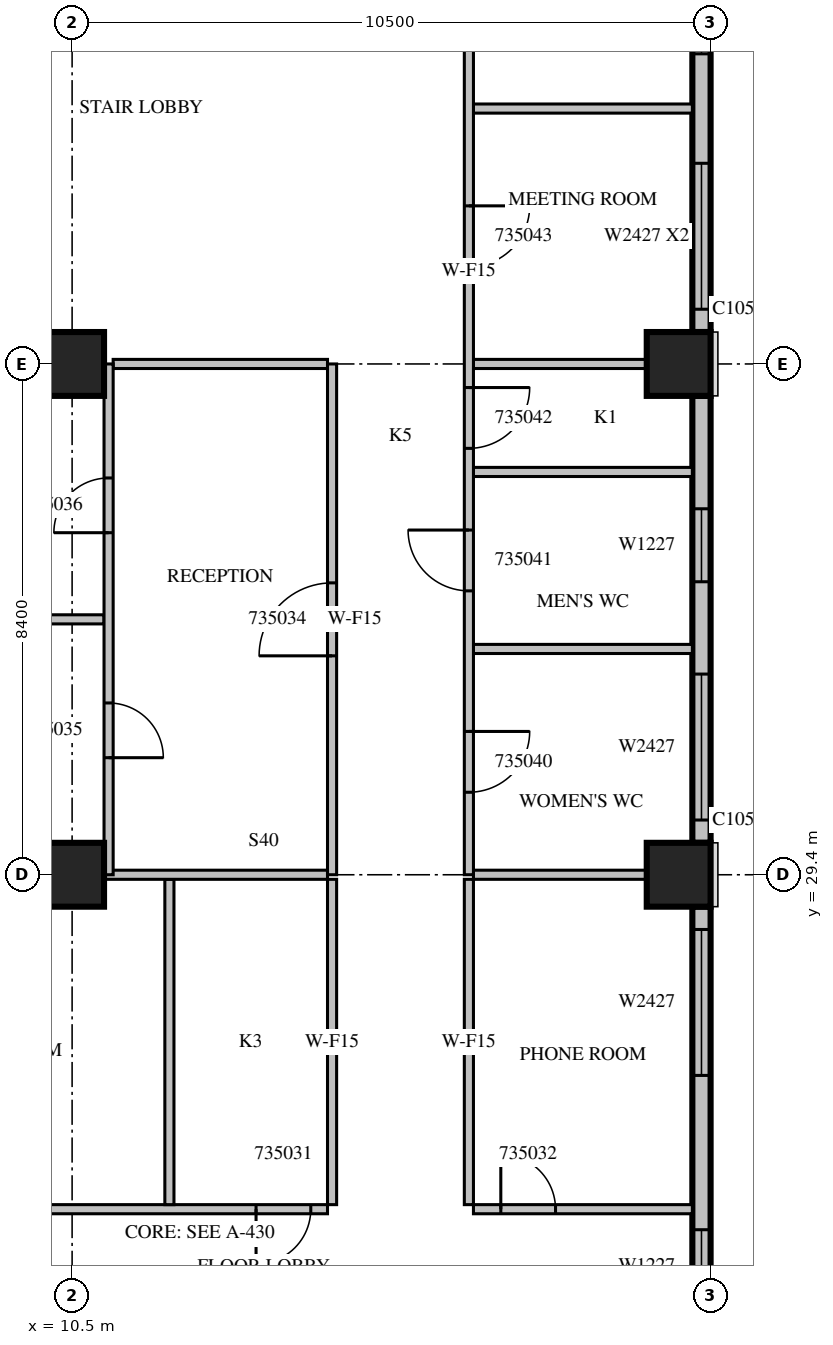
"""IFC4 building model, lengths in metres.
Left out: names, types, materials, properties, quantities, classifications, styles, units other than length and angle.
Written with IfcOpenShell. Run it as: python <this file> out.ifc"""

import sys

from ifc_helpers import new_model, si_unit, direction, frame, frame_2d, origin, origin_2d, place, context, subcontext, project, spatial, rectangle, extrude, source, transform, mapped, element, fill, save


model = new_model("IFC4")
c1 = context("Model", 3, precision=1e-05, world=origin(), true_north=direction((0.0, 1.0)))
c2 = subcontext(c1, "Body", "Model", "MODEL_VIEW")
j1 = project(units=[si_unit("LENGTHUNIT", "METRE"), si_unit("PLANEANGLEUNIT", "RADIAN")], contexts=[c1])
p1 = place(None, origin())
s1 = spatial("IfcSite", under=j1, at=p1, CompositionType="ELEMENT")
p2 = place(p1, origin())
s2 = spatial("IfcBuilding", under=s1, at=p2, CompositionType="ELEMENT")
p3 = place(p2, frame((0.0, 0.0, 158.1)))
s3 = spatial("IfcBuildingStorey", under=s2, at=p3, CompositionType="ELEMENT", Elevation=158.1)
m1 = source(origin(), c2, "Body", "SweptSolid", [
    extrude(rectangle(XDim=1.05, YDim=1.05, at=origin_2d()), origin(), (0.0, 0.0, 1.0), 4.2),
])
for number, where, z_axis, x_axis in (
    (1, (10.5, 29.4, 0.0), (0.0, 0.0, 1.0), (1.0, 0.0, 0.0)),
    (2, (20.475, 29.4, 0.0), (0.0, 0.0, 1.0), (1.0, 0.0, 0.0)),
    (3, (10.5, 37.8, 0.0), (0.0, 0.0, 1.0), (1.0, 0.0, 0.0)),
    (4, (20.475, 37.8, 0.0), (0.0, 0.0, 1.0), (1.0, 0.0, 0.0)),
):
    element("IfcColumn", number, at=place(p3, frame(where, z_axis=z_axis, x_axis=x_axis)), inside=s3, PredefinedType="COLUMN", context=c2, shape_type="MappedRepresentation", body=[
        mapped(m1, transform((0.0, 0.0, 0.0), scale=1.0)),
    ])
m2 = source(origin(), c2, "Body", "SweptSolid", [
    extrude(rectangle(XDim=6.875, YDim=0.3, at=frame_2d((3.438, 0.0))), origin(), (0.0, 0.0, 1.0), 3.8),
])
p4 = place(p3, frame((20.85, 22.0, 0.0), z_axis=(0.0, 0.0, 1.0), x_axis=(0.0, 1.0, 0.0)))
e5 = element("IfcWall", 5, at=p4, inside=s3, PredefinedType="STANDARD", context=c2, shape_type="MappedRepresentation", body=[
    mapped(m2, transform((0.0, 0.0, 0.0), scale=1.0)),
])
m3 = source(origin(), c2, "Body", "SweptSolid", [
    extrude(rectangle(XDim=1.2, YDim=2.7, at=frame_2d((0.6, 1.35))), frame((0.0, 0.16, 0.0), z_axis=(0.0, -1.0, 0.0), x_axis=(1.0, 0.0, 0.0)), (0.0, 0.0, 1.0), 0.32),
])
p5 = place(p4, frame((0.362, 0.0, 0.6)))
e6 = element("IfcOpeningElement", 6, at=p5, cuts=e5, PredefinedType="OPENING", context=c2, shape_type="MappedRepresentation", body=[
    mapped(m3, transform((0.0, 0.0, 0.0), scale=1.0)),
])
m4 = source(origin(), c2, "Body", "SweptSolid", [
    extrude(rectangle(XDim=2.4, YDim=2.7, at=frame_2d((1.2, 1.35))), frame((0.0, 0.16, 0.0), z_axis=(0.0, -1.0, 0.0), x_axis=(1.0, 0.0, 0.0)), (0.0, 0.0, 1.0), 0.32),
])
p6 = place(p4, frame((4.1, 0.0, 0.6)))
e7 = element("IfcOpeningElement", 7, at=p6, cuts=e5, PredefinedType="OPENING", context=c2, shape_type="MappedRepresentation", body=[
    mapped(m4, transform((0.0, 0.0, 0.0), scale=1.0)),
])
m5 = source(origin(), c2, "Body", "SweptSolid", [
    extrude(rectangle(XDim=7.35, YDim=0.3, at=frame_2d((3.675, 0.0))), origin(), (0.0, 0.0, 1.0), 3.8),
])
p7 = place(p3, frame((20.85, 29.925, 0.0), z_axis=(0.0, 0.0, 1.0), x_axis=(0.0, 1.0, 0.0)))
e8 = element("IfcWall", 8, at=p7, inside=s3, PredefinedType="STANDARD", context=c2, shape_type="MappedRepresentation", body=[
    mapped(m5, transform((0.0, 0.0, 0.0), scale=1.0)),
])
p8 = place(p7, frame((0.375, 0.0, 0.6)))
e9 = element("IfcOpeningElement", 9, at=p8, cuts=e8, PredefinedType="OPENING", context=c2, shape_type="MappedRepresentation", body=[
    mapped(m4, transform((0.0, 0.0, 0.0), scale=1.0)),
])
p9 = place(p7, frame((4.293, 0.0, 0.6)))
e10 = element("IfcOpeningElement", 10, at=p9, cuts=e8, PredefinedType="OPENING", context=c2, shape_type="MappedRepresentation", body=[
    mapped(m3, transform((0.0, 0.0, 0.0), scale=1.0)),
])
p10 = place(p3, frame((20.85, 38.325, 0.0), z_axis=(0.0, 0.0, 1.0), x_axis=(0.0, 1.0, 0.0)))
e11 = element("IfcWall", 11, at=p10, inside=s3, PredefinedType="STANDARD", context=c2, shape_type="MappedRepresentation", body=[
    mapped(m5, transform((0.0, 0.0, 0.0), scale=1.0)),
])
p11 = place(p10, frame((0.375, 0.0, 0.6)))
e12 = element("IfcOpeningElement", 12, at=p11, cuts=e11, PredefinedType="OPENING", context=c2, shape_type="MappedRepresentation", body=[
    mapped(m4, transform((0.0, 0.0, 0.0), scale=1.0)),
])
p12 = place(p10, frame((4.575, 0.0, 0.6)))
e13 = element("IfcOpeningElement", 13, at=p12, cuts=e11, PredefinedType="OPENING", context=c2, shape_type="MappedRepresentation", body=[
    mapped(m4, transform((0.0, 0.0, 0.0), scale=1.0)),
])
m6 = source(origin(), c2, "Body", "SweptSolid", [
    extrude(rectangle(XDim=8.195, YDim=0.15, at=frame_2d((4.098, 0.0))), origin(), (0.0, 0.0, 1.0), 3.8),
])
p13 = place(p3, frame((6.505, 23.9, 0.0), z_axis=(0.0, 0.0, 1.0), x_axis=(1.0, 0.0, 0.0)))
e14 = element("IfcWall", 14, at=p13, inside=s3, PredefinedType="PARTITIONING", context=c2, shape_type="MappedRepresentation", body=[
    mapped(m6, transform((0.0, 0.0, 0.0), scale=1.0)),
])
m7 = source(origin(), c2, "Body", "SweptSolid", [
    extrude(rectangle(XDim=0.9, YDim=2.1, at=frame_2d((0.45, 1.05))), frame((0.0, 0.085, 0.0), z_axis=(0.0, -1.0, 0.0), x_axis=(1.0, 0.0, 0.0)), (0.0, 0.0, 1.0), 0.17),
])
p14 = place(p13, frame((2.095, 0.0, 0.0)))
e15 = element("IfcOpeningElement", 15, at=p14, cuts=e14, PredefinedType="OPENING", context=c2, shape_type="MappedRepresentation", body=[
    mapped(m7, transform((0.0, 0.0, 0.0), scale=1.0)),
])
p15 = place(p13, frame((7.02, 0.0, 0.0)))
e16 = element("IfcOpeningElement", 16, at=p15, cuts=e14, PredefinedType="OPENING", context=c2, shape_type="MappedRepresentation", body=[
    mapped(m7, transform((0.0, 0.0, 0.0), scale=1.0)),
])
m8 = source(origin(), c2, "Body", "SweptSolid", [
    extrude(rectangle(XDim=3.6, YDim=0.15, at=frame_2d((1.8, 0.0))), origin(), (0.0, 0.0, 1.0), 3.8),
])
p16 = place(p3, frame((17.1, 23.9, 0.0), z_axis=(0.0, 0.0, 1.0), x_axis=(1.0, 0.0, 0.0)))
e17 = element("IfcWall", 17, at=p16, inside=s3, PredefinedType="PARTITIONING", context=c2, shape_type="MappedRepresentation", body=[
    mapped(m8, transform((0.0, 0.0, 0.0), scale=1.0)),
])
p17 = place(p16, frame((0.45, 0.0, 0.0)))
e18 = element("IfcOpeningElement", 18, at=p17, cuts=e17, PredefinedType="OPENING", context=c2, shape_type="MappedRepresentation", body=[
    mapped(m7, transform((0.0, 0.0, 0.0), scale=1.0)),
])
m9 = source(origin(), c2, "Body", "SweptSolid", [
    extrude(rectangle(XDim=5.35, YDim=0.15, at=frame_2d((2.675, 0.0))), origin(), (0.0, 0.0, 1.0), 3.8),
])
for number, where, z_axis, x_axis in (
    (19, (12.1, 23.975, 0.0), (0.0, 0.0, 1.0), (0.0, 1.0, 0.0)),
    (20, (14.775, 23.975, 0.0), (0.0, 0.0, 1.0), (0.0, 1.0, 0.0)),
    (21, (17.025, 29.325, 0.0), (0.0, 0.0, 1.0), (0.0, -1.0, 0.0)),
):
    element("IfcWall", number, at=place(p3, frame(where, z_axis=z_axis, x_axis=x_axis)), inside=s3, PredefinedType="PARTITIONING", context=c2, shape_type="MappedRepresentation", body=[
        mapped(m9, transform((0.0, 0.0, 0.0), scale=1.0)),
    ])
m10 = source(origin(), c2, "Body", "SweptSolid", [
    extrude(rectangle(XDim=3.676, YDim=0.15, at=frame_2d((1.838, 0.0))), origin(), (0.0, 0.0, 1.0), 3.8),
])
p18 = place(p3, frame((14.7, 29.4, 0.0), z_axis=(0.0, 0.0, 1.0), x_axis=(-1.0, 0.0, 0.0)))
e22 = element("IfcWall", 22, at=p18, inside=s3, PredefinedType="PARTITIONING", context=c2, shape_type="MappedRepresentation", body=[
    mapped(m10, transform((0.0, 0.0, 0.0), scale=1.0)),
])
m11 = source(origin(), c2, "Body", "SweptSolid", [
    extrude(rectangle(XDim=2.851, YDim=0.15, at=frame_2d((1.425, 0.0))), origin(), (0.0, 0.0, 1.0), 3.8),
])
p19 = place(p3, frame((19.951, 29.4, 0.0), z_axis=(0.0, 0.0, 1.0), x_axis=(-1.0, 0.0, 0.0)))
e23 = element("IfcWall", 23, at=p19, inside=s3, PredefinedType="PARTITIONING", context=c2, shape_type="MappedRepresentation", body=[
    mapped(m11, transform((0.0, 0.0, 0.0), scale=1.0)),
])
m12 = source(origin(), c2, "Body", "SweptSolid", [
    extrude(rectangle(XDim=4.52, YDim=0.15, at=frame_2d((2.26, 0.0))), origin(), (0.0, 0.0, 1.0), 3.8),
])
p20 = place(p3, frame((11.025, 33.6, 0.0), z_axis=(0.0, 0.0, 1.0), x_axis=(-1.0, 0.0, 0.0)))
e24 = element("IfcWall", 24, at=p20, inside=s3, PredefinedType="PARTITIONING", context=c2, shape_type="MappedRepresentation", body=[
    mapped(m12, transform((0.0, 0.0, 0.0), scale=1.0)),
])
m13 = source(origin(), c2, "Body", "SweptSolid", [
    extrude(rectangle(XDim=3.525, YDim=0.15, at=frame_2d((1.762, 0.0))), origin(), (0.0, 0.0, 1.0), 3.8),
])
p21 = place(p3, frame((14.7, 37.8, 0.0), z_axis=(0.0, 0.0, 1.0), x_axis=(-1.0, 0.0, 0.0)))
e25 = element("IfcWall", 25, at=p21, inside=s3, PredefinedType="PARTITIONING", context=c2, shape_type="MappedRepresentation", body=[
    mapped(m13, transform((0.0, 0.0, 0.0), scale=1.0)),
])
m14 = source(origin(), c2, "Body", "SweptSolid", [
    extrude(rectangle(XDim=8.4, YDim=0.15, at=frame_2d((4.2, 0.0))), origin(), (0.0, 0.0, 1.0), 3.8),
])
p22 = place(p3, frame((11.1, 29.4, 0.0), z_axis=(0.0, 0.0, 1.0), x_axis=(0.0, 1.0, 0.0)))
e26 = element("IfcWall", 26, at=p22, inside=s3, PredefinedType="PARTITIONING", context=c2, shape_type="MappedRepresentation", body=[
    mapped(m14, transform((0.0, 0.0, 0.0), scale=1.0)),
])
p23 = place(p22, frame((1.925, 0.0, 0.0)))
e27 = element("IfcOpeningElement", 27, at=p23, cuts=e26, PredefinedType="OPENING", context=c2, shape_type="MappedRepresentation", body=[
    mapped(m7, transform((0.0, 0.0, 0.0), scale=1.0)),
])
p24 = place(p22, frame((5.625, 0.0, 0.0)))
e28 = element("IfcOpeningElement", 28, at=p24, cuts=e26, PredefinedType="OPENING", context=c2, shape_type="MappedRepresentation", body=[
    mapped(m7, transform((0.0, 0.0, 0.0), scale=1.0)),
])
for number, where, z_axis, x_axis in (
    (29, (17.1, 33.113, 0.0), (0.0, 0.0, 1.0), (1.0, 0.0, 0.0)),
    (30, (17.1, 36.024, 0.0), (0.0, 0.0, 1.0), (1.0, 0.0, 0.0)),
):
    element("IfcWall", number, at=place(p3, frame(where, z_axis=z_axis, x_axis=x_axis)), inside=s3, PredefinedType="PARTITIONING", context=c2, shape_type="MappedRepresentation", body=[
        mapped(m8, transform((0.0, 0.0, 0.0), scale=1.0)),
    ])
p25 = place(p3, frame((19.951, 37.8, 0.0), z_axis=(0.0, 0.0, 1.0), x_axis=(-1.0, 0.0, 0.0)))
e31 = element("IfcWall", 31, at=p25, inside=s3, PredefinedType="PARTITIONING", context=c2, shape_type="MappedRepresentation", body=[
    mapped(m11, transform((0.0, 0.0, 0.0), scale=1.0)),
])
p26 = place(p3, frame((20.7, 42.0, 0.0), z_axis=(0.0, 0.0, 1.0), x_axis=(-1.0, 0.0, 0.0)))
e32 = element("IfcWall", 32, at=p26, inside=s3, PredefinedType="PARTITIONING", context=c2, shape_type="MappedRepresentation", body=[
    mapped(m8, transform((0.0, 0.0, 0.0), scale=1.0)),
])
p27 = place(p3, frame((14.775, 29.4, 0.0), z_axis=(0.0, 0.0, 1.0), x_axis=(0.0, 1.0, 0.0)))
e33 = element("IfcWall", 33, at=p27, inside=s3, PredefinedType="PARTITIONING", context=c2, shape_type="MappedRepresentation", body=[
    mapped(m14, transform((0.0, 0.0, 0.0), scale=1.0)),
])
m15 = source(origin(), c2, "Body", "SweptSolid", [
    extrude(rectangle(XDim=1.2, YDim=2.1, at=frame_2d((0.6, 1.05))), frame((0.0, 0.085, 0.0), z_axis=(0.0, -1.0, 0.0), x_axis=(1.0, 0.0, 0.0)), (0.0, 0.0, 1.0), 0.17),
])
p28 = place(p27, frame((3.6, 0.0, 0.0)))
e34 = element("IfcOpeningElement", 34, at=p28, cuts=e33, PredefinedType="OPENING", context=c2, shape_type="MappedRepresentation", body=[
    mapped(m15, transform((0.0, 0.0, 0.0), scale=1.0)),
])
m16 = source(origin(), c2, "Body", "SweptSolid", [
    extrude(rectangle(XDim=19.86, YDim=0.15, at=frame_2d((9.93, 0.0))), origin(), (0.0, 0.0, 1.0), 3.8),
])
p29 = place(p3, frame((17.025, 49.26, 0.0), z_axis=(0.0, 0.0, 1.0), x_axis=(0.0, -1.0, 0.0)))
e35 = element("IfcWall", 35, at=p29, inside=s3, PredefinedType="PARTITIONING", context=c2, shape_type="MappedRepresentation", body=[
    mapped(m16, transform((0.0, 0.0, 0.0), scale=1.0)),
])
m17 = source(origin(), c2, "Body", "SweptSolid", [
    extrude(rectangle(XDim=1.0, YDim=2.1, at=frame_2d((0.5, 1.05))), frame((0.0, 0.085, 0.0), z_axis=(0.0, -1.0, 0.0), x_axis=(1.0, 0.0, 0.0)), (0.0, 0.0, 1.0), 0.17),
])
p30 = place(p29, frame((17.503, 0.0, 0.0)))
e36 = element("IfcOpeningElement", 36, at=p30, cuts=e35, PredefinedType="OPENING", context=c2, shape_type="MappedRepresentation", body=[
    mapped(m17, transform((0.0, 0.0, 0.0), scale=1.0)),
])
p31 = place(p29, frame((14.191, 0.0, 0.0)))
e37 = element("IfcOpeningElement", 37, at=p31, cuts=e35, PredefinedType="OPENING", context=c2, shape_type="MappedRepresentation", body=[
    mapped(m17, transform((0.0, 0.0, 0.0), scale=1.0)),
])
p32 = place(p29, frame((11.848, 0.0, 0.0)))
e38 = element("IfcOpeningElement", 38, at=p32, cuts=e35, PredefinedType="OPENING", context=c2, shape_type="MappedRepresentation", body=[
    mapped(m17, transform((0.0, 0.0, 0.0), scale=1.0)),
])
p33 = place(p29, frame((8.86, 0.0, 0.0)))
e39 = element("IfcOpeningElement", 39, at=p33, cuts=e35, PredefinedType="OPENING", context=c2, shape_type="MappedRepresentation", body=[
    mapped(m17, transform((0.0, 0.0, 0.0), scale=1.0)),
])
p34 = place(p29, frame((3.092, 0.0, 0.0)))
e40 = element("IfcOpeningElement", 40, at=p34, cuts=e35, PredefinedType="OPENING", context=c2, shape_type="MappedRepresentation", body=[
    mapped(m17, transform((0.0, 0.0, 0.0), scale=1.0)),
])
m18 = source(origin(), c2, "Body", "SweptSolid", [
    extrude(rectangle(XDim=1.2, YDim=2.7, at=frame_2d((0.6, 1.35))), frame((0.0, 0.03, 0.0), z_axis=(0.0, -1.0, 0.0), x_axis=(1.0, 0.0, 0.0)), (0.0, 0.0, 1.0), 0.06),
])
p35 = place(p5, origin())
e41 = element("IfcWindow", 41, at=p35, inside=s3, PartitioningType="SINGLE_PANEL", PredefinedType="WINDOW", context=c2, shape_type="MappedRepresentation", body=[
    mapped(m18, transform((0.0, 0.0, 0.0), scale=1.0)),
])
fill(e6, e41)
m19 = source(origin(), c2, "Body", "SweptSolid", [
    extrude(rectangle(XDim=2.4, YDim=2.7, at=frame_2d((1.2, 1.35))), frame((0.0, 0.03, 0.0), z_axis=(0.0, -1.0, 0.0), x_axis=(1.0, 0.0, 0.0)), (0.0, 0.0, 1.0), 0.06),
])
p36 = place(p6, origin())
e42 = element("IfcWindow", 42, at=p36, inside=s3, PartitioningType="SINGLE_PANEL", PredefinedType="WINDOW", context=c2, shape_type="MappedRepresentation", body=[
    mapped(m19, transform((0.0, 0.0, 0.0), scale=1.0)),
])
fill(e7, e42)
p37 = place(p8, origin())
e43 = element("IfcWindow", 43, at=p37, inside=s3, PartitioningType="SINGLE_PANEL", PredefinedType="WINDOW", context=c2, shape_type="MappedRepresentation", body=[
    mapped(m19, transform((0.0, 0.0, 0.0), scale=1.0)),
])
fill(e9, e43)
p38 = place(p9, origin())
e44 = element("IfcWindow", 44, at=p38, inside=s3, PartitioningType="SINGLE_PANEL", PredefinedType="WINDOW", context=c2, shape_type="MappedRepresentation", body=[
    mapped(m18, transform((0.0, 0.0, 0.0), scale=1.0)),
])
fill(e10, e44)
p39 = place(p11, origin())
e45 = element("IfcWindow", 45, at=p39, inside=s3, PartitioningType="SINGLE_PANEL", PredefinedType="WINDOW", context=c2, shape_type="MappedRepresentation", body=[
    mapped(m19, transform((0.0, 0.0, 0.0), scale=1.0)),
])
fill(e12, e45)
p40 = place(p12, origin())
e46 = element("IfcWindow", 46, at=p40, inside=s3, PartitioningType="SINGLE_PANEL", PredefinedType="WINDOW", context=c2, shape_type="MappedRepresentation", body=[
    mapped(m19, transform((0.0, 0.0, 0.0), scale=1.0)),
])
fill(e13, e46)
m20 = source(origin(), c2, "Body", "SweptSolid", [
    extrude(rectangle(XDim=0.9, YDim=2.1, at=frame_2d((0.45, 1.05))), frame((0.0, 0.025, 0.0), z_axis=(0.0, -1.0, 0.0), x_axis=(1.0, 0.0, 0.0)), (0.0, 0.0, 1.0), 0.05),
])
p41 = place(p15, origin())
e47 = element("IfcDoor", 47, at=p41, inside=s3, OperationType="SINGLE_SWING_RIGHT", PredefinedType="DOOR", context=c2, shape_type="MappedRepresentation", body=[
    mapped(m20, transform((0.0, 0.0, 0.0), scale=1.0)),
])
fill(e16, e47)
p42 = place(p17, origin())
e48 = element("IfcDoor", 48, at=p42, inside=s3, OperationType="SINGLE_SWING_LEFT", PredefinedType="DOOR", context=c2, shape_type="MappedRepresentation", body=[
    mapped(m20, transform((0.0, 0.0, 0.0), scale=1.0)),
])
fill(e18, e48)
m21 = source(origin(), c2, "Body", "SweptSolid", [
    extrude(rectangle(XDim=1.2, YDim=2.1, at=frame_2d((0.6, 1.05))), frame((0.0, 0.025, 0.0), z_axis=(0.0, -1.0, 0.0), x_axis=(1.0, 0.0, 0.0)), (0.0, 0.0, 1.0), 0.05),
])
p43 = place(p28, origin())
e49 = element("IfcDoor", 49, at=p43, inside=s3, OperationType="SINGLE_SWING_LEFT", PredefinedType="DOOR", context=c2, shape_type="MappedRepresentation", body=[
    mapped(m21, transform((0.0, 0.0, 0.0), scale=1.0)),
])
fill(e34, e49)
p44 = place(p23, origin())
e50 = element("IfcDoor", 50, at=p44, inside=s3, OperationType="SINGLE_SWING_RIGHT", PredefinedType="DOOR", context=c2, shape_type="MappedRepresentation", body=[
    mapped(m20, transform((0.0, 0.0, 0.0), scale=1.0)),
])
fill(e27, e50)
p45 = place(p24, origin())
e51 = element("IfcDoor", 51, at=p45, inside=s3, OperationType="SINGLE_SWING_LEFT", PredefinedType="DOOR", context=c2, shape_type="MappedRepresentation", body=[
    mapped(m20, transform((0.0, 0.0, 0.0), scale=1.0)),
])
fill(e28, e51)
m22 = source(origin(), c2, "Body", "SweptSolid", [
    extrude(rectangle(XDim=1.0, YDim=2.1, at=frame_2d((0.5, 1.05))), frame((0.0, 0.025, 0.0), z_axis=(0.0, -1.0, 0.0), x_axis=(1.0, 0.0, 0.0)), (0.0, 0.0, 1.0), 0.05),
])
p46 = place(p30, origin())
e52 = element("IfcDoor", 52, at=p46, inside=s3, OperationType="SINGLE_SWING_LEFT", PredefinedType="DOOR", context=c2, shape_type="MappedRepresentation", body=[
    mapped(m22, transform((0.0, 0.0, 0.0), scale=1.0)),
])
fill(e36, e52)
p47 = place(p31, origin())
e53 = element("IfcDoor", 53, at=p47, inside=s3, OperationType="SINGLE_SWING_RIGHT", PredefinedType="DOOR", context=c2, shape_type="MappedRepresentation", body=[
    mapped(m22, transform((0.0, 0.0, 0.0), scale=1.0)),
])
fill(e37, e53)
p48 = place(p32, origin())
e54 = element("IfcDoor", 54, at=p48, inside=s3, OperationType="SINGLE_SWING_LEFT", PredefinedType="DOOR", context=c2, shape_type="MappedRepresentation", body=[
    mapped(m22, transform((0.0, 0.0, 0.0), scale=1.0)),
])
fill(e38, e54)
p49 = place(p33, origin())
e55 = element("IfcDoor", 55, at=p49, inside=s3, OperationType="SINGLE_SWING_LEFT", PredefinedType="DOOR", context=c2, shape_type="MappedRepresentation", body=[
    mapped(m22, transform((0.0, 0.0, 0.0), scale=1.0)),
])
fill(e39, e55)
save(model, sys.argv[1])
